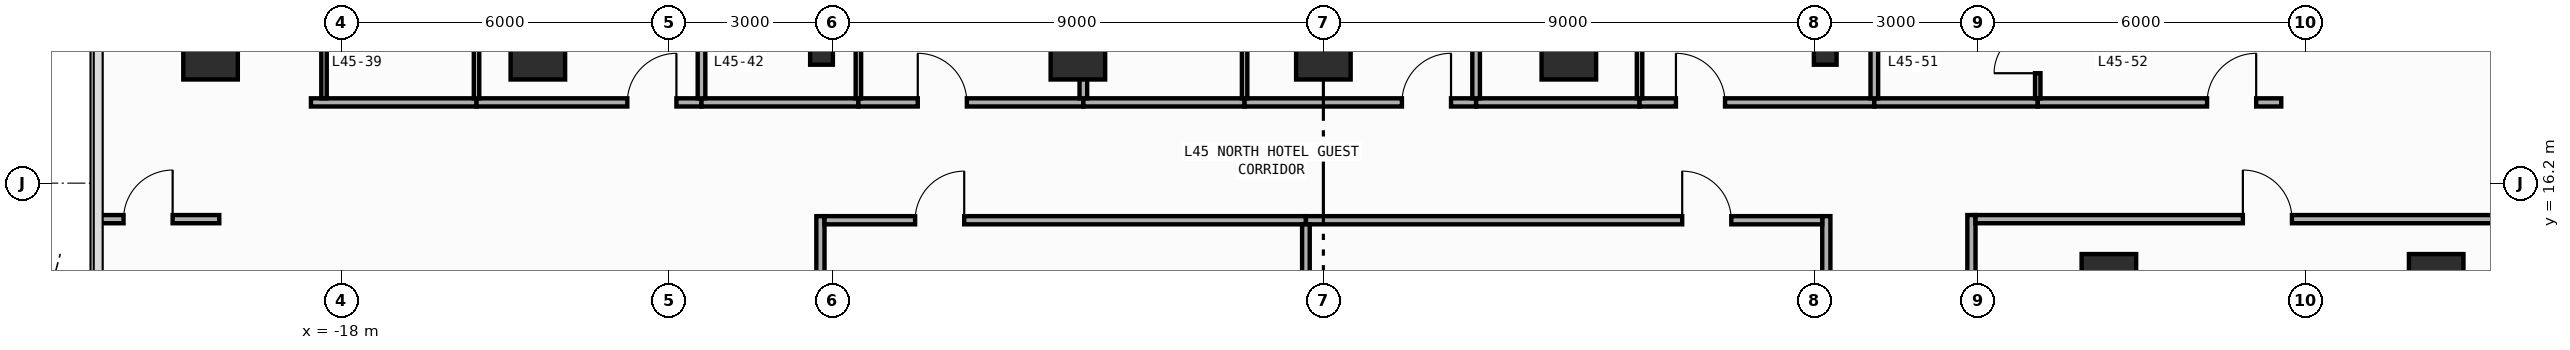
"""IFC4 building model, lengths in metres.
Left out: names, types, materials, properties, quantities, classifications, styles, units other than length and angle.
Written with IfcOpenShell. Run it as: python <this file> out.ifc"""

import sys

from ifc_helpers import new_model, si_unit, direction, frame, frame_2d, origin, origin_2d, place, context, subcontext, project, spatial, rectangle, i_section, extrude, element, fill, save


model = new_model("IFC4")
c1 = context("Model", 3, precision=1e-05, world=origin(), true_north=direction((0.0, 1.0)))
c2 = subcontext(c1, "Body", "Model", "MODEL_VIEW")
j1 = project(units=[si_unit("LENGTHUNIT", "METRE"), si_unit("PLANEANGLEUNIT", "RADIAN")], contexts=[c1])
p1 = place(None, origin())
s1 = spatial("IfcSite", under=j1, at=p1, CompositionType="ELEMENT")
p2 = place(p1, origin())
s2 = spatial("IfcBuilding", under=s1, at=p2, CompositionType="ELEMENT")
p3 = place(p2, frame((0.0, 0.0, 195.4)))
s3 = spatial("IfcBuildingStorey", under=s2, at=p3, CompositionType="ELEMENT", Elevation=195.4)
for number, where, z_axis, x_axis in (
    (1, (-9.2, 18.6, 0.0), (0.0, 0.0, 1.0), (1.0, 0.0, 0.0)),
    (2, (9.2, 18.6, 0.0), (0.0, 0.0, 1.0), (1.0, 0.0, 0.0)),
):
    element("IfcColumn", number, at=place(p3, frame(where, z_axis=z_axis, x_axis=x_axis)), inside=s3, PredefinedType="COLUMN", context=c2, shape_type="SweptSolid", body=[
        extrude(i_section(OverallWidth=0.417, OverallDepth=0.458, WebThickness=0.03, FlangeThickness=0.05, FilletRadius=0.022, at=origin_2d()), origin(), (0.0, 0.0, 1.0), 3.8),
    ])
for number, where, z_axis, x_axis in (
    (3, (-20.4, 18.6, 0.0), (0.0, 0.0, 1.0), (1.0, 0.0, 0.0)),
    (4, (20.4, 14.4, 0.0), (0.0, 0.0, 1.0), (1.0, 0.0, 0.0)),
    (5, (-14.4, 18.6, 0.0), (0.0, 0.0, 1.0), (1.0, 0.0, 0.0)),
    (6, (14.4, 14.4, 0.0), (0.0, 0.0, 1.0), (1.0, 0.0, 0.0)),
    (7, (-4.5, 18.6, 0.0), (0.0, 0.0, 1.0), (1.0, 0.0, 0.0)),
    (8, (0.0, 18.6, 0.0), (0.0, 0.0, 1.0), (1.0, 0.0, 0.0)),
    (9, (4.5, 18.6, 0.0), (0.0, 0.0, 1.0), (1.0, 0.0, 0.0)),
):
    element("IfcColumn", number, at=place(p3, frame(where, z_axis=z_axis, x_axis=x_axis)), inside=s3, PredefinedType="COLUMN", context=c2, shape_type="SweptSolid", body=[
        extrude(rectangle(XDim=1.0, YDim=1.0, at=origin_2d()), origin(), (0.0, 0.0, 1.0), 3.8),
    ])
p4 = place(p3, frame((-9.22, 2.8, 0.0), z_axis=(0.0, 0.0, 1.0), x_axis=(0.0, 1.0, 0.0)))
e10 = element("IfcWall", 10, at=p4, inside=s3, PredefinedType="PARTITIONING", context=c2, shape_type="SweptSolid", body=[
    extrude(rectangle(XDim=12.795, YDim=0.15, at=frame_2d((6.397, 0.0))), origin(), (0.0, 0.0, 1.0), 2.952),
])
p5 = place(p4, frame((2.086, 0.0, 0.0)))
e11 = element("IfcOpeningElement", 11, at=p5, cuts=e10, PredefinedType="OPENING", context=c2, shape_type="SweptSolid", body=[
    extrude(rectangle(XDim=0.9, YDim=2.15, at=frame_2d((0.45, 1.075))), frame((0.0, 0.085, 0.0), z_axis=(0.0, -1.0, 0.0), x_axis=(1.0, 0.0, 0.0)), (0.0, 0.0, 1.0), 0.17),
])
p6 = place(p3, frame((9.22, 2.8, 0.0), z_axis=(0.0, 0.0, 1.0), x_axis=(0.0, 1.0, 0.0)))
e12 = element("IfcWall", 12, at=p6, inside=s3, PredefinedType="PARTITIONING", context=c2, shape_type="SweptSolid", body=[
    extrude(rectangle(XDim=12.795, YDim=0.15, at=frame_2d((6.397, 0.0))), origin(), (0.0, 0.0, 1.0), 2.952),
])
p7 = place(p6, frame((2.086, 0.0, 0.0)))
e13 = element("IfcOpeningElement", 13, at=p7, cuts=e12, PredefinedType="OPENING", context=c2, shape_type="SweptSolid", body=[
    extrude(rectangle(XDim=0.9, YDim=2.15, at=frame_2d((0.45, 1.075))), frame((0.0, 0.085, 0.0), z_axis=(0.0, -1.0, 0.0), x_axis=(1.0, 0.0, 0.0)), (0.0, 0.0, 1.0), 0.17),
])
p8 = place(p3, frame((11.88, 7.16, 0.0), z_axis=(0.0, 0.0, 1.0), x_axis=(0.0, 1.0, 0.0)))
e14 = element("IfcWall", 14, at=p8, inside=s3, PredefinedType="PARTITIONING", context=c2, shape_type="SweptSolid", body=[
    extrude(rectangle(XDim=8.455, YDim=0.15, at=frame_2d((4.228, 0.0))), origin(), (0.0, 0.0, 1.0), 3.54),
])
p9 = place(p8, frame((0.46, 0.0, 0.0)))
e15 = element("IfcOpeningElement", 15, at=p9, cuts=e14, PredefinedType="OPENING", context=c2, shape_type="SweptSolid", body=[
    extrude(rectangle(XDim=0.9, YDim=2.15, at=frame_2d((0.45, 1.075))), frame((0.0, 0.085, 0.0), z_axis=(0.0, -1.0, 0.0), x_axis=(1.0, 0.0, 0.0)), (0.0, 0.0, 1.0), 0.17),
])
p10 = place(p3, frame((-9.145, 15.52, 0.0), z_axis=(0.0, 0.0, 1.0), x_axis=(1.0, 0.0, 0.0)))
e16 = element("IfcWall", 16, at=p10, inside=s3, PredefinedType="PARTITIONING", context=c2, shape_type="SweptSolid", body=[
    extrude(rectangle(XDim=8.825, YDim=0.15, at=frame_2d((4.413, 0.0))), origin(), (0.0, 0.0, 1.0), 3.54),
])
p11 = place(p10, frame((1.661, 0.0, 0.0)))
e17 = element("IfcOpeningElement", 17, at=p11, cuts=e16, PredefinedType="OPENING", context=c2, shape_type="SweptSolid", body=[
    extrude(rectangle(XDim=0.9, YDim=2.15, at=frame_2d((0.45, 1.075))), frame((0.0, 0.085, 0.0), z_axis=(0.0, -1.0, 0.0), x_axis=(1.0, 0.0, 0.0)), (0.0, 0.0, 1.0), 0.17),
])
p12 = place(p3, frame((-0.32, 15.52, 0.0), z_axis=(0.0, 0.0, 1.0), x_axis=(1.0, 0.0, 0.0)))
e18 = element("IfcWall", 18, at=p12, inside=s3, PredefinedType="PARTITIONING", context=c2, shape_type="SweptSolid", body=[
    extrude(rectangle(XDim=9.465, YDim=0.15, at=frame_2d((4.732, 0.0))), origin(), (0.0, 0.0, 1.0), 3.54),
])
p13 = place(p12, frame((6.898, 0.0, 0.0)))
e19 = element("IfcOpeningElement", 19, at=p13, cuts=e18, PredefinedType="OPENING", context=c2, shape_type="SweptSolid", body=[
    extrude(rectangle(XDim=0.9, YDim=2.15, at=frame_2d((0.45, 1.075))), frame((0.0, 0.085, 0.0), z_axis=(0.0, -1.0, 0.0), x_axis=(1.0, 0.0, 0.0)), (0.0, 0.0, 1.0), 0.17),
])
p14 = place(p3, frame((-18.56, 17.68, 0.0), z_axis=(0.0, 0.0, 1.0), x_axis=(1.0, 0.0, 0.0)))
e20 = element("IfcWall", 20, at=p14, inside=s3, PredefinedType="PARTITIONING", context=c2, shape_type="SweptSolid", body=[
    extrude(rectangle(XDim=3.036, YDim=0.15, at=frame_2d((1.518, 0.0))), origin(), (0.0, 0.0, 1.0), 3.54),
])
p15 = place(p3, frame((-15.524, 17.68, 0.0), z_axis=(0.0, 0.0, 1.0), x_axis=(1.0, 0.0, 0.0)))
e21 = element("IfcWall", 21, at=p15, inside=s3, PredefinedType="PARTITIONING", context=c2, shape_type="SweptSolid", body=[
    extrude(rectangle(XDim=4.124, YDim=0.15, at=frame_2d((2.062, 0.0))), origin(), (0.0, 0.0, 1.0), 3.54),
])
p16 = place(p15, frame((2.764, 0.0, 0.0)))
e22 = element("IfcOpeningElement", 22, at=p16, cuts=e21, PredefinedType="OPENING", context=c2, shape_type="SweptSolid", body=[
    extrude(rectangle(XDim=0.9, YDim=2.15, at=frame_2d((0.45, 1.075))), frame((0.0, 0.085, 0.0), z_axis=(0.0, -1.0, 0.0), x_axis=(1.0, 0.0, 0.0)), (0.0, 0.0, 1.0), 0.17),
])
p17 = place(p3, frame((-11.4, 17.68, 0.0), z_axis=(0.0, 0.0, 1.0), x_axis=(1.0, 0.0, 0.0)))
e23 = element("IfcWall", 23, at=p17, inside=s3, PredefinedType="PARTITIONING", context=c2, shape_type="SweptSolid", body=[
    extrude(rectangle(XDim=2.876, YDim=0.15, at=frame_2d((1.438, 0.0))), origin(), (0.0, 0.0, 1.0), 3.54),
])
p18 = place(p3, frame((-8.524, 17.68, 0.0), z_axis=(0.0, 0.0, 1.0), x_axis=(1.0, 0.0, 0.0)))
e24 = element("IfcWall", 24, at=p18, inside=s3, PredefinedType="PARTITIONING", context=c2, shape_type="SweptSolid", body=[
    extrude(rectangle(XDim=4.124, YDim=0.15, at=frame_2d((2.062, 0.0))), origin(), (0.0, 0.0, 1.0), 3.54),
])
p19 = place(p18, frame((1.088, 0.0, 0.0)))
e25 = element("IfcOpeningElement", 25, at=p19, cuts=e24, PredefinedType="OPENING", context=c2, shape_type="SweptSolid", body=[
    extrude(rectangle(XDim=0.9, YDim=2.15, at=frame_2d((0.45, 1.075))), frame((0.0, 0.085, 0.0), z_axis=(0.0, -1.0, 0.0), x_axis=(1.0, 0.0, 0.0)), (0.0, 0.0, 1.0), 0.17),
])
p20 = place(p3, frame((-4.4, 17.68, 0.0), z_axis=(0.0, 0.0, 1.0), x_axis=(1.0, 0.0, 0.0)))
e26 = element("IfcWall", 26, at=p20, inside=s3, PredefinedType="PARTITIONING", context=c2, shape_type="SweptSolid", body=[
    extrude(rectangle(XDim=2.956, YDim=0.15, at=frame_2d((1.478, 0.0))), origin(), (0.0, 0.0, 1.0), 3.54),
])
p21 = place(p3, frame((-1.444, 17.68, 0.0), z_axis=(0.0, 0.0, 1.0), x_axis=(1.0, 0.0, 0.0)))
e27 = element("IfcWall", 27, at=p21, inside=s3, PredefinedType="PARTITIONING", context=c2, shape_type="SweptSolid", body=[
    extrude(rectangle(XDim=4.244, YDim=0.15, at=frame_2d((2.122, 0.0))), origin(), (0.0, 0.0, 1.0), 3.54),
])
p22 = place(p21, frame((2.884, 0.0, 0.0)))
e28 = element("IfcOpeningElement", 28, at=p22, cuts=e27, PredefinedType="OPENING", context=c2, shape_type="SweptSolid", body=[
    extrude(rectangle(XDim=0.9, YDim=2.15, at=frame_2d((0.45, 1.075))), frame((0.0, 0.085, 0.0), z_axis=(0.0, -1.0, 0.0), x_axis=(1.0, 0.0, 0.0)), (0.0, 0.0, 1.0), 0.17),
])
p23 = place(p3, frame((2.8, 17.68, 0.0), z_axis=(0.0, 0.0, 1.0), x_axis=(1.0, 0.0, 0.0)))
e29 = element("IfcWall", 29, at=p23, inside=s3, PredefinedType="PARTITIONING", context=c2, shape_type="SweptSolid", body=[
    extrude(rectangle(XDim=2.996, YDim=0.15, at=frame_2d((1.498, 0.0))), origin(), (0.0, 0.0, 1.0), 3.54),
])
p24 = place(p3, frame((5.796, 17.68, 0.0), z_axis=(0.0, 0.0, 1.0), x_axis=(1.0, 0.0, 0.0)))
e30 = element("IfcWall", 30, at=p24, inside=s3, PredefinedType="PARTITIONING", context=c2, shape_type="SweptSolid", body=[
    extrude(rectangle(XDim=4.304, YDim=0.15, at=frame_2d((2.152, 0.0))), origin(), (0.0, 0.0, 1.0), 3.54),
])
p25 = place(p24, frame((0.667, 0.0, 0.0)))
e31 = element("IfcOpeningElement", 31, at=p25, cuts=e30, PredefinedType="OPENING", context=c2, shape_type="SweptSolid", body=[
    extrude(rectangle(XDim=0.9, YDim=2.15, at=frame_2d((0.45, 1.075))), frame((0.0, 0.085, 0.0), z_axis=(0.0, -1.0, 0.0), x_axis=(1.0, 0.0, 0.0)), (0.0, 0.0, 1.0), 0.17),
])
p26 = place(p3, frame((10.1, 17.68, 0.0), z_axis=(0.0, 0.0, 1.0), x_axis=(1.0, 0.0, 0.0)))
e32 = element("IfcWall", 32, at=p26, inside=s3, PredefinedType="PARTITIONING", context=c2, shape_type="SweptSolid", body=[
    extrude(rectangle(XDim=2.996, YDim=0.15, at=frame_2d((1.498, 0.0))), origin(), (0.0, 0.0, 1.0), 3.54),
])
p27 = place(p3, frame((13.096, 17.68, 0.0), z_axis=(0.0, 0.0, 1.0), x_axis=(1.0, 0.0, 0.0)))
e33 = element("IfcWall", 33, at=p27, inside=s3, PredefinedType="PARTITIONING", context=c2, shape_type="SweptSolid", body=[
    extrude(rectangle(XDim=4.464, YDim=0.15, at=frame_2d((2.232, 0.0))), origin(), (0.0, 0.0, 1.0), 3.54),
])
p28 = place(p27, frame((3.104, 0.0, 0.0)))
e34 = element("IfcOpeningElement", 34, at=p28, cuts=e33, PredefinedType="OPENING", context=c2, shape_type="SweptSolid", body=[
    extrude(rectangle(XDim=0.9, YDim=2.15, at=frame_2d((0.45, 1.075))), frame((0.0, 0.085, 0.0), z_axis=(0.0, -1.0, 0.0), x_axis=(1.0, 0.0, 0.0)), (0.0, 0.0, 1.0), 0.17),
])
p29 = place(p3, frame((11.955, 15.54, 0.0), z_axis=(0.0, 0.0, 1.0), x_axis=(1.0, 0.0, 0.0)))
e35 = element("IfcWall", 35, at=p29, inside=s3, PredefinedType="PARTITIONING", context=c2, shape_type="SweptSolid", body=[
    extrude(rectangle(XDim=10.5, YDim=0.15, at=frame_2d((5.25, 0.0))), origin(), (0.0, 0.0, 1.0), 3.54),
])
p30 = place(p29, frame((4.901, 0.0, 0.0)))
e36 = element("IfcOpeningElement", 36, at=p30, cuts=e35, PredefinedType="OPENING", context=c2, shape_type="SweptSolid", body=[
    extrude(rectangle(XDim=0.9, YDim=2.15, at=frame_2d((0.45, 1.075))), frame((0.0, 0.085, 0.0), z_axis=(0.0, -1.0, 0.0), x_axis=(1.0, 0.0, 0.0)), (0.0, 0.0, 1.0), 0.17),
])
p31 = place(p3, frame((-22.455, 15.54, 0.0), z_axis=(0.0, 0.0, 1.0), x_axis=(1.0, 0.0, 0.0)))
e37 = element("IfcWall", 37, at=p31, inside=s3, PredefinedType="PARTITIONING", context=c2, shape_type="SweptSolid", body=[
    extrude(rectangle(XDim=2.215, YDim=0.15, at=frame_2d((1.107, 0.0))), origin(), (0.0, 0.0, 1.0), 3.54),
])
p32 = place(p31, frame((0.46, 0.0, 0.0)))
e38 = element("IfcOpeningElement", 38, at=p32, cuts=e37, PredefinedType="OPENING", context=c2, shape_type="SweptSolid", body=[
    extrude(rectangle(XDim=0.9, YDim=2.15, at=frame_2d((0.45, 1.075))), frame((0.0, 0.085, 0.0), z_axis=(0.0, -1.0, 0.0), x_axis=(1.0, 0.0, 0.0)), (0.0, 0.0, 1.0), 0.17),
])
p33 = place(p3, frame((-0.32, 2.87, 0.0), z_axis=(0.0, 0.0, 1.0), x_axis=(0.0, 1.0, 0.0)))
e39 = element("IfcWall", 39, at=p33, inside=s3, PredefinedType="PARTITIONING", context=c2, shape_type="SweptSolid", body=[
    extrude(rectangle(XDim=12.575, YDim=0.14, at=frame_2d((6.288, 0.0))), origin(), (0.0, 0.0, 1.0), 3.54),
])
p34 = place(p3, frame((-15.524, 17.755, 0.0), z_axis=(0.0, 0.0, 1.0), x_axis=(0.0, 1.0, 0.0)))
e40 = element("IfcWall", 40, at=p34, inside=s3, PredefinedType="PARTITIONING", context=c2, shape_type="SweptSolid", body=[
    extrude(rectangle(XDim=2.965, YDim=0.1, at=frame_2d((1.482, 0.0))), origin(), (0.0, 0.0, 1.0), 3.54),
])
p35 = place(p34, frame((1.705, 0.0, 0.0)))
e41 = element("IfcOpeningElement", 41, at=p35, cuts=e40, PredefinedType="OPENING", context=c2, shape_type="SweptSolid", body=[
    extrude(rectangle(XDim=0.8, YDim=2.1, at=frame_2d((0.4, 1.05))), frame((0.0, 0.06, 0.0), z_axis=(0.0, -1.0, 0.0), x_axis=(1.0, 0.0, 0.0)), (0.0, 0.0, 1.0), 0.12),
])
p36 = place(p3, frame((-11.4, 17.755, 0.0), z_axis=(0.0, 0.0, 1.0), x_axis=(0.0, 1.0, 0.0)))
e42 = element("IfcWall", 42, at=p36, inside=s3, PredefinedType="PARTITIONING", context=c2, shape_type="SweptSolid", body=[
    extrude(rectangle(XDim=3.015, YDim=0.14, at=frame_2d((1.508, 0.0))), origin(), (0.0, 0.0, 1.0), 3.54),
])
p37 = place(p3, frame((-8.524, 17.755, 0.0), z_axis=(0.0, 0.0, 1.0), x_axis=(0.0, 1.0, 0.0)))
e43 = element("IfcWall", 43, at=p37, inside=s3, PredefinedType="PARTITIONING", context=c2, shape_type="SweptSolid", body=[
    extrude(rectangle(XDim=2.965, YDim=0.1, at=frame_2d((1.482, 0.0))), origin(), (0.0, 0.0, 1.0), 3.54),
])
p38 = place(p37, frame((1.705, 0.0, 0.0)))
e44 = element("IfcOpeningElement", 44, at=p38, cuts=e43, PredefinedType="OPENING", context=c2, shape_type="SweptSolid", body=[
    extrude(rectangle(XDim=0.8, YDim=2.1, at=frame_2d((0.4, 1.05))), frame((0.0, 0.06, 0.0), z_axis=(0.0, -1.0, 0.0), x_axis=(1.0, 0.0, 0.0)), (0.0, 0.0, 1.0), 0.12),
])
p39 = place(p3, frame((-4.4, 17.755, 0.0), z_axis=(0.0, 0.0, 1.0), x_axis=(0.0, 1.0, 0.0)))
e45 = element("IfcWall", 45, at=p39, inside=s3, PredefinedType="PARTITIONING", context=c2, shape_type="SweptSolid", body=[
    extrude(rectangle(XDim=3.015, YDim=0.14, at=frame_2d((1.508, 0.0))), origin(), (0.0, 0.0, 1.0), 3.54),
])
p40 = place(p3, frame((-1.444, 17.755, 0.0), z_axis=(0.0, 0.0, 1.0), x_axis=(0.0, 1.0, 0.0)))
e46 = element("IfcWall", 46, at=p40, inside=s3, PredefinedType="PARTITIONING", context=c2, shape_type="SweptSolid", body=[
    extrude(rectangle(XDim=2.965, YDim=0.1, at=frame_2d((1.482, 0.0))), origin(), (0.0, 0.0, 1.0), 3.54),
])
p41 = place(p40, frame((1.705, 0.0, 0.0)))
e47 = element("IfcOpeningElement", 47, at=p41, cuts=e46, PredefinedType="OPENING", context=c2, shape_type="SweptSolid", body=[
    extrude(rectangle(XDim=0.8, YDim=2.1, at=frame_2d((0.4, 1.05))), frame((0.0, 0.06, 0.0), z_axis=(0.0, -1.0, 0.0), x_axis=(1.0, 0.0, 0.0)), (0.0, 0.0, 1.0), 0.12),
])
p42 = place(p3, frame((2.8, 17.755, 0.0), z_axis=(0.0, 0.0, 1.0), x_axis=(0.0, 1.0, 0.0)))
e48 = element("IfcWall", 48, at=p42, inside=s3, PredefinedType="PARTITIONING", context=c2, shape_type="SweptSolid", body=[
    extrude(rectangle(XDim=3.015, YDim=0.14, at=frame_2d((1.508, 0.0))), origin(), (0.0, 0.0, 1.0), 3.54),
])
p43 = place(p3, frame((5.796, 17.755, 0.0), z_axis=(0.0, 0.0, 1.0), x_axis=(0.0, 1.0, 0.0)))
e49 = element("IfcWall", 49, at=p43, inside=s3, PredefinedType="PARTITIONING", context=c2, shape_type="SweptSolid", body=[
    extrude(rectangle(XDim=2.965, YDim=0.1, at=frame_2d((1.482, 0.0))), origin(), (0.0, 0.0, 1.0), 3.54),
])
p44 = place(p43, frame((1.705, 0.0, 0.0)))
e50 = element("IfcOpeningElement", 50, at=p44, cuts=e49, PredefinedType="OPENING", context=c2, shape_type="SweptSolid", body=[
    extrude(rectangle(XDim=0.8, YDim=2.1, at=frame_2d((0.4, 1.05))), frame((0.0, 0.06, 0.0), z_axis=(0.0, -1.0, 0.0), x_axis=(1.0, 0.0, 0.0)), (0.0, 0.0, 1.0), 0.12),
])
p45 = place(p3, frame((10.1, 17.755, 0.0), z_axis=(0.0, 0.0, 1.0), x_axis=(0.0, 1.0, 0.0)))
e51 = element("IfcWall", 51, at=p45, inside=s3, PredefinedType="PARTITIONING", context=c2, shape_type="SweptSolid", body=[
    extrude(rectangle(XDim=3.015, YDim=0.14, at=frame_2d((1.508, 0.0))), origin(), (0.0, 0.0, 1.0), 3.54),
])
p46 = place(p3, frame((13.096, 17.755, 0.0), z_axis=(0.0, 0.0, 1.0), x_axis=(0.0, 1.0, 0.0)))
e52 = element("IfcWall", 52, at=p46, inside=s3, PredefinedType="PARTITIONING", context=c2, shape_type="SweptSolid", body=[
    extrude(rectangle(XDim=2.965, YDim=0.1, at=frame_2d((1.482, 0.0))), origin(), (0.0, 0.0, 1.0), 3.54),
])
p47 = place(p46, frame((0.46, 0.0, 0.0)))
e53 = element("IfcOpeningElement", 53, at=p47, cuts=e52, PredefinedType="OPENING", context=c2, shape_type="SweptSolid", body=[
    extrude(rectangle(XDim=0.8, YDim=2.1, at=frame_2d((0.4, 1.05))), frame((0.0, 0.06, 0.0), z_axis=(0.0, -1.0, 0.0), x_axis=(1.0, 0.0, 0.0)), (0.0, 0.0, 1.0), 0.12),
])
p48 = place(p3, frame((-18.32, 17.755, 0.0), z_axis=(0.0, 0.0, 1.0), x_axis=(0.0, 1.0, 0.0)))
e54 = element("IfcWall", 54, at=p48, inside=s3, PredefinedType="PARTITIONING", context=c2, shape_type="SweptSolid", body=[
    extrude(rectangle(XDim=2.965, YDim=0.1, at=frame_2d((1.482, 0.0))), origin(), (0.0, 0.0, 1.0), 3.54),
])
p49 = place(p11, origin())
e55 = element("IfcDoor", 55, at=p49, inside=s3, OperationType="SINGLE_SWING_RIGHT", PredefinedType="DOOR", context=c2, shape_type="SweptSolid", body=[
    extrude(rectangle(XDim=0.9, YDim=2.15, at=frame_2d((0.45, 1.075))), frame((0.0, 0.025, 0.0), z_axis=(0.0, -1.0, 0.0), x_axis=(1.0, 0.0, 0.0)), (0.0, 0.0, 1.0), 0.05),
])
fill(e17, e55)
p50 = place(p13, origin())
e56 = element("IfcDoor", 56, at=p50, inside=s3, OperationType="SINGLE_SWING_LEFT", PredefinedType="DOOR", context=c2, shape_type="SweptSolid", body=[
    extrude(rectangle(XDim=0.9, YDim=2.15, at=frame_2d((0.45, 1.075))), frame((0.0, 0.025, 0.0), z_axis=(0.0, -1.0, 0.0), x_axis=(1.0, 0.0, 0.0)), (0.0, 0.0, 1.0), 0.05),
])
fill(e19, e56)
p51 = place(p16, origin())
e57 = element("IfcDoor", 57, at=p51, inside=s3, OperationType="SINGLE_SWING_RIGHT", PredefinedType="DOOR", context=c2, shape_type="SweptSolid", body=[
    extrude(rectangle(XDim=0.9, YDim=2.15, at=frame_2d((0.45, 1.075))), frame((0.0, 0.025, 0.0), z_axis=(0.0, -1.0, 0.0), x_axis=(1.0, 0.0, 0.0)), (0.0, 0.0, 1.0), 0.05),
])
fill(e22, e57)
p52 = place(p19, origin())
e58 = element("IfcDoor", 58, at=p52, inside=s3, OperationType="SINGLE_SWING_LEFT", PredefinedType="DOOR", context=c2, shape_type="SweptSolid", body=[
    extrude(rectangle(XDim=0.9, YDim=2.15, at=frame_2d((0.45, 1.075))), frame((0.0, 0.025, 0.0), z_axis=(0.0, -1.0, 0.0), x_axis=(1.0, 0.0, 0.0)), (0.0, 0.0, 1.0), 0.05),
])
fill(e25, e58)
p53 = place(p22, origin())
e59 = element("IfcDoor", 59, at=p53, inside=s3, OperationType="SINGLE_SWING_RIGHT", PredefinedType="DOOR", context=c2, shape_type="SweptSolid", body=[
    extrude(rectangle(XDim=0.9, YDim=2.15, at=frame_2d((0.45, 1.075))), frame((0.0, 0.025, 0.0), z_axis=(0.0, -1.0, 0.0), x_axis=(1.0, 0.0, 0.0)), (0.0, 0.0, 1.0), 0.05),
])
fill(e28, e59)
p54 = place(p25, origin())
e60 = element("IfcDoor", 60, at=p54, inside=s3, OperationType="SINGLE_SWING_LEFT", PredefinedType="DOOR", context=c2, shape_type="SweptSolid", body=[
    extrude(rectangle(XDim=0.9, YDim=2.15, at=frame_2d((0.45, 1.075))), frame((0.0, 0.025, 0.0), z_axis=(0.0, -1.0, 0.0), x_axis=(1.0, 0.0, 0.0)), (0.0, 0.0, 1.0), 0.05),
])
fill(e31, e60)
p55 = place(p28, origin())
e61 = element("IfcDoor", 61, at=p55, inside=s3, OperationType="SINGLE_SWING_RIGHT", PredefinedType="DOOR", context=c2, shape_type="SweptSolid", body=[
    extrude(rectangle(XDim=0.9, YDim=2.15, at=frame_2d((0.45, 1.075))), frame((0.0, 0.025, 0.0), z_axis=(0.0, -1.0, 0.0), x_axis=(1.0, 0.0, 0.0)), (0.0, 0.0, 1.0), 0.05),
])
fill(e34, e61)
p56 = place(p30, origin())
e62 = element("IfcDoor", 62, at=p56, inside=s3, OperationType="SINGLE_SWING_LEFT", PredefinedType="DOOR", context=c2, shape_type="SweptSolid", body=[
    extrude(rectangle(XDim=0.9, YDim=2.15, at=frame_2d((0.45, 1.075))), frame((0.0, 0.025, 0.0), z_axis=(0.0, -1.0, 0.0), x_axis=(1.0, 0.0, 0.0)), (0.0, 0.0, 1.0), 0.05),
])
fill(e36, e62)
p57 = place(p32, origin())
e63 = element("IfcDoor", 63, at=p57, inside=s3, OperationType="SINGLE_SWING_RIGHT", PredefinedType="DOOR", context=c2, shape_type="SweptSolid", body=[
    extrude(rectangle(XDim=0.9, YDim=2.15, at=frame_2d((0.45, 1.075))), frame((0.0, 0.025, 0.0), z_axis=(0.0, -1.0, 0.0), x_axis=(1.0, 0.0, 0.0)), (0.0, 0.0, 1.0), 0.05),
])
fill(e38, e63)
p58 = place(p47, origin())
e64 = element("IfcDoor", 64, at=p58, inside=s3, OperationType="SINGLE_SWING_LEFT", PredefinedType="DOOR", context=c2, shape_type="SweptSolid", body=[
    extrude(rectangle(XDim=0.8, YDim=2.1, at=frame_2d((0.4, 1.05))), frame((0.0, 0.025, 0.0), z_axis=(0.0, -1.0, 0.0), x_axis=(1.0, 0.0, 0.0)), (0.0, 0.0, 1.0), 0.05),
])
fill(e53, e64)
save(model, sys.argv[1])
